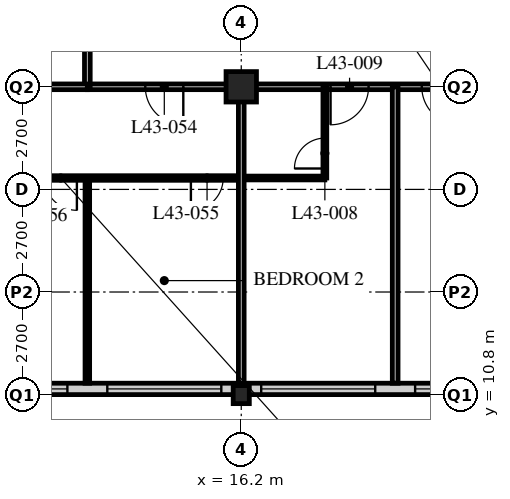
"""IFC4 building model, lengths in metres.
Left out: names, types, materials, properties, quantities, classifications, styles, units other than length and angle.
Written with IfcOpenShell. Run it as: python <this file> out.ifc"""

import sys

from ifc_helpers import new_model, si_unit, direction, frame, frame_2d, origin, origin_2d, place, context, subcontext, project, spatial, rectangle, hollow_rectangle, i_section, extrude, element, fill, save


model = new_model("IFC4")
c1 = context("Model", 3, precision=1e-05, world=origin(), true_north=direction((0.0, 1.0)))
c2 = subcontext(c1, "Body", "Model", "MODEL_VIEW")
j1 = project(units=[si_unit("LENGTHUNIT", "METRE"), si_unit("PLANEANGLEUNIT", "RADIAN")], contexts=[c1])
p1 = place(None, origin())
s1 = spatial("IfcSite", under=j1, at=p1, CompositionType="ELEMENT")
p2 = place(p1, origin())
s2 = spatial("IfcBuilding", under=s1, at=p2, CompositionType="ELEMENT")
p3 = place(p2, frame((0.0, 0.0, 170.4)))
s3 = spatial("IfcBuildingStorey", under=s2, at=p3, CompositionType="ELEMENT", Elevation=170.4)
p4 = place(p3, frame((16.2, 10.8, 0.0), z_axis=(0.0, 0.0, 1.0), x_axis=(1.0, 0.0, 0.0)))
e1 = element("IfcColumn", 1, at=p4, inside=s3, PredefinedType="COLUMN", context=c2, shape_type="SweptSolid", body=[
    extrude(i_section(OverallWidth=0.424, OverallDepth=0.475, WebThickness=0.048, FlangeThickness=0.077, FilletRadius=0.015, at=origin_2d()), origin(), (0.0, 0.0, 1.0), 3.6),
])
p5 = place(p3, frame((16.2, 18.9, 0.0), z_axis=(0.0, 0.0, 1.0), x_axis=(1.0, 0.0, 0.0)))
e2 = element("IfcColumn", 2, at=p5, inside=s3, PredefinedType="COLUMN", context=c2, shape_type="SweptSolid", body=[
    extrude(hollow_rectangle(XDim=0.8, YDim=0.8, WallThickness=0.08, at=origin_2d()), origin(), (0.0, 0.0, 1.0), 3.6),
])
p6 = place(p3, frame((8.4, 10.95, 0.0), z_axis=(0.0, 0.0, 1.0), x_axis=(1.0, 0.0, 0.0)))
e3 = element("IfcWall", 3, at=p6, inside=s3, PredefinedType="SOLIDWALL", context=c2, shape_type="SweptSolid", body=[
    extrude(rectangle(XDim=40.2, YDim=0.3, at=frame_2d((20.1, 0.0))), origin(), (0.0, 0.0, 1.0), 3.39),
])
p7 = place(p6, frame((0.225, 0.0, 0.6)))
e4 = element("IfcOpeningElement", 4, at=p7, cuts=e3, PredefinedType="OPENING", context=c2, shape_type="SweptSolid", body=[
    extrude(rectangle(XDim=3.0, YDim=2.4, at=frame_2d((1.5, 1.2))), frame((0.0, 0.16, 0.0), z_axis=(0.0, -1.0, 0.0), x_axis=(1.0, 0.0, 0.0)), (0.0, 0.0, 1.0), 0.32),
])
p8 = place(p6, frame((4.275, 0.0, 0.6)))
e5 = element("IfcOpeningElement", 5, at=p8, cuts=e3, PredefinedType="OPENING", context=c2, shape_type="SweptSolid", body=[
    extrude(rectangle(XDim=3.0, YDim=2.4, at=frame_2d((1.5, 1.2))), frame((0.0, 0.16, 0.0), z_axis=(0.0, -1.0, 0.0), x_axis=(1.0, 0.0, 0.0)), (0.0, 0.0, 1.0), 0.32),
])
p9 = place(p6, frame((8.325, 0.0, 0.6)))
e6 = element("IfcOpeningElement", 6, at=p9, cuts=e3, PredefinedType="OPENING", context=c2, shape_type="SweptSolid", body=[
    extrude(rectangle(XDim=3.0, YDim=2.4, at=frame_2d((1.5, 1.2))), frame((0.0, 0.16, 0.0), z_axis=(0.0, -1.0, 0.0), x_axis=(1.0, 0.0, 0.0)), (0.0, 0.0, 1.0), 0.32),
])
p10 = place(p6, frame((12.375, 0.0, 0.6)))
e7 = element("IfcOpeningElement", 7, at=p10, cuts=e3, PredefinedType="OPENING", context=c2, shape_type="SweptSolid", body=[
    extrude(rectangle(XDim=3.0, YDim=2.4, at=frame_2d((1.5, 1.2))), frame((0.0, 0.16, 0.0), z_axis=(0.0, -1.0, 0.0), x_axis=(1.0, 0.0, 0.0)), (0.0, 0.0, 1.0), 0.32),
])
p11 = place(p6, frame((16.425, 0.0, 0.6)))
e8 = element("IfcOpeningElement", 8, at=p11, cuts=e3, PredefinedType="OPENING", context=c2, shape_type="SweptSolid", body=[
    extrude(rectangle(XDim=3.0, YDim=2.4, at=frame_2d((1.5, 1.2))), frame((0.0, 0.16, 0.0), z_axis=(0.0, -1.0, 0.0), x_axis=(1.0, 0.0, 0.0)), (0.0, 0.0, 1.0), 0.32),
])
p12 = place(p6, frame((20.475, 0.0, 0.6)))
e9 = element("IfcOpeningElement", 9, at=p12, cuts=e3, PredefinedType="OPENING", context=c2, shape_type="SweptSolid", body=[
    extrude(rectangle(XDim=3.0, YDim=2.4, at=frame_2d((1.5, 1.2))), frame((0.0, 0.16, 0.0), z_axis=(0.0, -1.0, 0.0), x_axis=(1.0, 0.0, 0.0)), (0.0, 0.0, 1.0), 0.32),
])
p13 = place(p6, frame((24.525, 0.0, 0.6)))
e10 = element("IfcOpeningElement", 10, at=p13, cuts=e3, PredefinedType="OPENING", context=c2, shape_type="SweptSolid", body=[
    extrude(rectangle(XDim=3.0, YDim=2.4, at=frame_2d((1.5, 1.2))), frame((0.0, 0.16, 0.0), z_axis=(0.0, -1.0, 0.0), x_axis=(1.0, 0.0, 0.0)), (0.0, 0.0, 1.0), 0.32),
])
p14 = place(p6, frame((28.575, 0.0, 0.6)))
e11 = element("IfcOpeningElement", 11, at=p14, cuts=e3, PredefinedType="OPENING", context=c2, shape_type="SweptSolid", body=[
    extrude(rectangle(XDim=3.0, YDim=2.4, at=frame_2d((1.5, 1.2))), frame((0.0, 0.16, 0.0), z_axis=(0.0, -1.0, 0.0), x_axis=(1.0, 0.0, 0.0)), (0.0, 0.0, 1.0), 0.32),
])
p15 = place(p6, frame((32.625, 0.0, 0.6)))
e12 = element("IfcOpeningElement", 12, at=p15, cuts=e3, PredefinedType="OPENING", context=c2, shape_type="SweptSolid", body=[
    extrude(rectangle(XDim=3.0, YDim=2.4, at=frame_2d((1.5, 1.2))), frame((0.0, 0.16, 0.0), z_axis=(0.0, -1.0, 0.0), x_axis=(1.0, 0.0, 0.0)), (0.0, 0.0, 1.0), 0.32),
])
p16 = place(p6, frame((36.675, 0.0, 0.6)))
e13 = element("IfcOpeningElement", 13, at=p16, cuts=e3, PredefinedType="OPENING", context=c2, shape_type="SweptSolid", body=[
    extrude(rectangle(XDim=3.0, YDim=2.4, at=frame_2d((1.5, 1.2))), frame((0.0, 0.16, 0.0), z_axis=(0.0, -1.0, 0.0), x_axis=(1.0, 0.0, 0.0)), (0.0, 0.0, 1.0), 0.32),
])
p17 = place(p3, frame((12.15, 18.9, 0.0), z_axis=(0.0, 0.0, 1.0), x_axis=(1.0, 0.0, 0.0)))
e14 = element("IfcWall", 14, at=p17, inside=s3, PredefinedType="PARTITIONING", context=c2, shape_type="SweptSolid", body=[
    extrude(rectangle(XDim=32.4, YDim=0.15, at=frame_2d((16.2, 0.0))), origin(), (0.0, 0.0, 1.0), 2.778),
])
p18 = place(p17, frame((6.4, 0.0, 0.0)))
e15 = element("IfcOpeningElement", 15, at=p18, cuts=e14, PredefinedType="OPENING", context=c2, shape_type="SweptSolid", body=[
    extrude(rectangle(XDim=1.0, YDim=2.1, at=frame_2d((0.5, 1.05))), frame((0.0, 0.085, 0.0), z_axis=(0.0, -1.0, 0.0), x_axis=(1.0, 0.0, 0.0)), (0.0, 0.0, 1.0), 0.17),
])
p19 = place(p17, frame((8.8, 0.0, 0.0)))
e16 = element("IfcOpeningElement", 16, at=p19, cuts=e14, PredefinedType="OPENING", context=c2, shape_type="SweptSolid", body=[
    extrude(rectangle(XDim=1.0, YDim=2.1, at=frame_2d((0.5, 1.05))), frame((0.0, 0.085, 0.0), z_axis=(0.0, -1.0, 0.0), x_axis=(1.0, 0.0, 0.0)), (0.0, 0.0, 1.0), 0.17),
])
p20 = place(p17, frame((13.05, 0.0, 0.0)))
e17 = element("IfcOpeningElement", 17, at=p20, cuts=e14, PredefinedType="OPENING", context=c2, shape_type="SweptSolid", body=[
    extrude(rectangle(XDim=1.0, YDim=2.1, at=frame_2d((0.5, 1.05))), frame((0.0, 0.085, 0.0), z_axis=(0.0, -1.0, 0.0), x_axis=(1.0, 0.0, 0.0)), (0.0, 0.0, 1.0), 0.17),
])
p21 = place(p17, frame((22.6, 0.0, 0.0)))
e18 = element("IfcOpeningElement", 18, at=p21, cuts=e14, PredefinedType="OPENING", context=c2, shape_type="SweptSolid", body=[
    extrude(rectangle(XDim=1.0, YDim=2.1, at=frame_2d((0.5, 1.05))), frame((0.0, 0.085, 0.0), z_axis=(0.0, -1.0, 0.0), x_axis=(1.0, 0.0, 0.0)), (0.0, 0.0, 1.0), 0.17),
])
p22 = place(p17, frame((25.0, 0.0, 0.0)))
e19 = element("IfcOpeningElement", 19, at=p22, cuts=e14, PredefinedType="OPENING", context=c2, shape_type="SweptSolid", body=[
    extrude(rectangle(XDim=1.0, YDim=2.1, at=frame_2d((0.5, 1.05))), frame((0.0, 0.085, 0.0), z_axis=(0.0, -1.0, 0.0), x_axis=(1.0, 0.0, 0.0)), (0.0, 0.0, 1.0), 0.17),
])
p23 = place(p17, frame((1.525, 0.0, 0.0)))
e20 = element("IfcOpeningElement", 20, at=p23, cuts=e14, PredefinedType="OPENING", context=c2, shape_type="SweptSolid", body=[
    extrude(rectangle(XDim=1.0, YDim=2.1, at=frame_2d((0.5, 1.05))), frame((0.0, 0.085, 0.0), z_axis=(0.0, -1.0, 0.0), x_axis=(1.0, 0.0, 0.0)), (0.0, 0.0, 1.0), 0.17),
])
p24 = place(p17, frame((29.875, 0.0, 0.0)))
e21 = element("IfcOpeningElement", 21, at=p24, cuts=e14, PredefinedType="OPENING", context=c2, shape_type="SweptSolid", body=[
    extrude(rectangle(XDim=1.0, YDim=2.1, at=frame_2d((0.5, 1.05))), frame((0.0, 0.085, 0.0), z_axis=(0.0, -1.0, 0.0), x_axis=(1.0, 0.0, 0.0)), (0.0, 0.0, 1.0), 0.17),
])
p25 = place(p3, frame((12.15, 18.9, 0.0), z_axis=(0.0, 0.0, 1.0), x_axis=(0.0, 1.0, 0.0)))
e22 = element("IfcWall", 22, at=p25, inside=s3, PredefinedType="PARTITIONING", context=c2, shape_type="SweptSolid", body=[
    extrude(rectangle(XDim=24.3, YDim=0.15, at=frame_2d((12.15, 0.0))), origin(), (0.0, 0.0, 1.0), 3.39),
])
p26 = place(p25, frame((2.35, 0.0, 0.0)))
e23 = element("IfcOpeningElement", 23, at=p26, cuts=e22, PredefinedType="OPENING", context=c2, shape_type="SweptSolid", body=[
    extrude(rectangle(XDim=1.0, YDim=2.1, at=frame_2d((0.5, 1.05))), frame((0.0, 0.085, 0.0), z_axis=(0.0, -1.0, 0.0), x_axis=(1.0, 0.0, 0.0)), (0.0, 0.0, 1.0), 0.17),
])
p27 = place(p25, frame((6.4, 0.0, 0.0)))
e24 = element("IfcOpeningElement", 24, at=p27, cuts=e22, PredefinedType="OPENING", context=c2, shape_type="SweptSolid", body=[
    extrude(rectangle(XDim=1.0, YDim=2.1, at=frame_2d((0.5, 1.05))), frame((0.0, 0.085, 0.0), z_axis=(0.0, -1.0, 0.0), x_axis=(1.0, 0.0, 0.0)), (0.0, 0.0, 1.0), 0.17),
])
p28 = place(p25, frame((8.5, 0.0, 0.0)))
e25 = element("IfcOpeningElement", 25, at=p28, cuts=e22, PredefinedType="OPENING", context=c2, shape_type="SweptSolid", body=[
    extrude(rectangle(XDim=1.0, YDim=2.1, at=frame_2d((0.5, 1.05))), frame((0.0, 0.085, 0.0), z_axis=(0.0, -1.0, 0.0), x_axis=(1.0, 0.0, 0.0)), (0.0, 0.0, 1.0), 0.17),
])
p29 = place(p25, frame((16.6, 0.0, 0.0)))
e26 = element("IfcOpeningElement", 26, at=p29, cuts=e22, PredefinedType="OPENING", context=c2, shape_type="SweptSolid", body=[
    extrude(rectangle(XDim=1.0, YDim=2.1, at=frame_2d((0.5, 1.05))), frame((0.0, 0.085, 0.0), z_axis=(0.0, -1.0, 0.0), x_axis=(1.0, 0.0, 0.0)), (0.0, 0.0, 1.0), 0.17),
])
p30 = place(p3, frame((16.2, 16.5, 0.0), z_axis=(0.0, 0.0, 1.0), x_axis=(1.0, 0.0, 0.0)))
e27 = element("IfcWall", 27, at=p30, inside=s3, PredefinedType="PARTITIONING", context=c2, shape_type="SweptSolid", body=[
    extrude(rectangle(XDim=2.2, YDim=0.1, at=frame_2d((1.1, 0.0))), origin(), (0.0, 0.0, 1.0), 3.39),
])
p31 = place(p3, frame((18.4, 18.9, 0.0), z_axis=(0.0, 0.0, 1.0), x_axis=(0.0, -1.0, 0.0)))
e28 = element("IfcWall", 28, at=p31, inside=s3, PredefinedType="PARTITIONING", context=c2, shape_type="SweptSolid", body=[
    extrude(rectangle(XDim=2.4, YDim=0.1, at=frame_2d((1.2, 0.0))), origin(), (0.0, 0.0, 1.0), 3.39),
])
p32 = place(p31, frame((1.35, 0.0, 0.0)))
e29 = element("IfcOpeningElement", 29, at=p32, cuts=e28, PredefinedType="OPENING", context=c2, shape_type="SweptSolid", body=[
    extrude(rectangle(XDim=0.8, YDim=2.1, at=frame_2d((0.4, 1.05))), frame((0.0, 0.06, 0.0), z_axis=(0.0, -1.0, 0.0), x_axis=(1.0, 0.0, 0.0)), (0.0, 0.0, 1.0), 0.12),
])
p33 = place(p3, frame((20.25, 18.9, 0.0), z_axis=(0.0, 0.0, 1.0), x_axis=(0.0, -1.0, 0.0)))
e30 = element("IfcWall", 30, at=p33, inside=s3, PredefinedType="PARTITIONING", context=c2, shape_type="SweptSolid", body=[
    extrude(rectangle(XDim=7.8, YDim=0.15, at=frame_2d((3.9, 0.0))), origin(), (0.0, 0.0, 1.0), 3.39),
])
p34 = place(p3, frame((8.15, 16.5, 0.0), z_axis=(0.0, 0.0, 1.0), x_axis=(1.0, 0.0, 0.0)))
e31 = element("IfcWall", 31, at=p34, inside=s3, PredefinedType="PARTITIONING", context=c2, shape_type="SweptSolid", body=[
    extrude(rectangle(XDim=8.05, YDim=0.12, at=frame_2d((4.025, 0.0))), origin(), (0.0, 0.0, 1.0), 3.39),
])
p35 = place(p34, frame((6.725, 0.0, 0.0)))
e32 = element("IfcOpeningElement", 32, at=p35, cuts=e31, PredefinedType="OPENING", context=c2, shape_type="SweptSolid", body=[
    extrude(rectangle(XDim=0.85, YDim=2.1, at=frame_2d((0.425, 1.05))), frame((0.0, 0.07, 0.0), z_axis=(0.0, -1.0, 0.0), x_axis=(1.0, 0.0, 0.0)), (0.0, 0.0, 1.0), 0.14),
])
p36 = place(p34, frame((2.875, 0.0, 0.0)))
e33 = element("IfcOpeningElement", 33, at=p36, cuts=e31, PredefinedType="OPENING", context=c2, shape_type="SweptSolid", body=[
    extrude(rectangle(XDim=0.85, YDim=2.1, at=frame_2d((0.425, 1.05))), frame((0.0, 0.07, 0.0), z_axis=(0.0, -1.0, 0.0), x_axis=(1.0, 0.0, 0.0)), (0.0, 0.0, 1.0), 0.14),
])
p37 = place(p3, frame((12.15, 16.5, 0.0), z_axis=(0.0, 0.0, 1.0), x_axis=(0.0, -1.0, 0.0)))
e34 = element("IfcWall", 34, at=p37, inside=s3, PredefinedType="PARTITIONING", context=c2, shape_type="SweptSolid", body=[
    extrude(rectangle(XDim=5.4, YDim=0.12, at=frame_2d((2.7, 0.0))), origin(), (0.0, 0.0, 1.0), 3.39),
])
for number, where, z_axis, x_axis in (
    (35, (4.35, 18.9, 0.0), (0.0, 0.0, 1.0), (1.0, 0.0, 0.0)),
    (36, (16.2, 18.9, 0.0), (0.0, 0.0, 1.0), (0.0, -1.0, 0.0)),
):
    element("IfcWall", number, at=place(p3, frame(where, z_axis=z_axis, x_axis=x_axis)), inside=s3, PredefinedType="PARTITIONING", context=c2, shape_type="SweptSolid", body=[
        extrude(rectangle(XDim=7.8, YDim=0.15, at=frame_2d((3.9, 0.0))), origin(), (0.0, 0.0, 1.0), 2.778),
    ])
p38 = place(p7, origin())
e37 = element("IfcWindow", 37, at=p38, inside=s3, PartitioningType="SINGLE_PANEL", PredefinedType="WINDOW", context=c2, shape_type="SweptSolid", body=[
    extrude(rectangle(XDim=3.0, YDim=2.4, at=frame_2d((1.5, 1.2))), frame((0.0, 0.03, 0.0), z_axis=(0.0, -1.0, 0.0), x_axis=(1.0, 0.0, 0.0)), (0.0, 0.0, 1.0), 0.06),
])
fill(e4, e37)
p39 = place(p8, origin())
e38 = element("IfcWindow", 38, at=p39, inside=s3, PartitioningType="SINGLE_PANEL", PredefinedType="WINDOW", context=c2, shape_type="SweptSolid", body=[
    extrude(rectangle(XDim=3.0, YDim=2.4, at=frame_2d((1.5, 1.2))), frame((0.0, 0.03, 0.0), z_axis=(0.0, -1.0, 0.0), x_axis=(1.0, 0.0, 0.0)), (0.0, 0.0, 1.0), 0.06),
])
fill(e5, e38)
p40 = place(p9, origin())
e39 = element("IfcWindow", 39, at=p40, inside=s3, PartitioningType="SINGLE_PANEL", PredefinedType="WINDOW", context=c2, shape_type="SweptSolid", body=[
    extrude(rectangle(XDim=3.0, YDim=2.4, at=frame_2d((1.5, 1.2))), frame((0.0, 0.03, 0.0), z_axis=(0.0, -1.0, 0.0), x_axis=(1.0, 0.0, 0.0)), (0.0, 0.0, 1.0), 0.06),
])
fill(e6, e39)
p41 = place(p10, origin())
e40 = element("IfcWindow", 40, at=p41, inside=s3, PartitioningType="SINGLE_PANEL", PredefinedType="WINDOW", context=c2, shape_type="SweptSolid", body=[
    extrude(rectangle(XDim=3.0, YDim=2.4, at=frame_2d((1.5, 1.2))), frame((0.0, 0.03, 0.0), z_axis=(0.0, -1.0, 0.0), x_axis=(1.0, 0.0, 0.0)), (0.0, 0.0, 1.0), 0.06),
])
fill(e7, e40)
p42 = place(p32, origin())
e41 = element("IfcDoor", 41, at=p42, inside=s3, OperationType="SINGLE_SWING_LEFT", PredefinedType="DOOR", context=c2, shape_type="SweptSolid", body=[
    extrude(rectangle(XDim=0.8, YDim=2.1, at=frame_2d((0.4, 1.05))), frame((0.0, 0.025, 0.0), z_axis=(0.0, -1.0, 0.0), x_axis=(1.0, 0.0, 0.0)), (0.0, 0.0, 1.0), 0.05),
])
fill(e29, e41)
p43 = place(p18, origin())
e42 = element("IfcDoor", 42, at=p43, inside=s3, OperationType="SINGLE_SWING_RIGHT", PredefinedType="DOOR", context=c2, shape_type="SweptSolid", body=[
    extrude(rectangle(XDim=1.0, YDim=2.1, at=frame_2d((0.5, 1.05))), frame((0.0, 0.025, 0.0), z_axis=(0.0, -1.0, 0.0), x_axis=(1.0, 0.0, 0.0)), (0.0, 0.0, 1.0), 0.05),
])
fill(e15, e42)
p44 = place(p19, origin())
e43 = element("IfcDoor", 43, at=p44, inside=s3, OperationType="SINGLE_SWING_LEFT", PredefinedType="DOOR", context=c2, shape_type="SweptSolid", body=[
    extrude(rectangle(XDim=1.0, YDim=2.1, at=frame_2d((0.5, 1.05))), frame((0.0, 0.025, 0.0), z_axis=(0.0, -1.0, 0.0), x_axis=(1.0, 0.0, 0.0)), (0.0, 0.0, 1.0), 0.05),
])
fill(e16, e43)
p45 = place(p23, origin())
e44 = element("IfcDoor", 44, at=p45, inside=s3, OperationType="SINGLE_SWING_LEFT", PredefinedType="DOOR", context=c2, shape_type="SweptSolid", body=[
    extrude(rectangle(XDim=1.0, YDim=2.1, at=frame_2d((0.5, 1.05))), frame((0.0, 0.025, 0.0), z_axis=(0.0, -1.0, 0.0), x_axis=(1.0, 0.0, 0.0)), (0.0, 0.0, 1.0), 0.05),
])
fill(e20, e44)
p46 = place(p35, origin())
e45 = element("IfcDoor", 45, at=p46, inside=s3, OperationType="SINGLE_SWING_RIGHT", PredefinedType="DOOR", context=c2, shape_type="SweptSolid", body=[
    extrude(rectangle(XDim=0.85, YDim=2.1, at=frame_2d((0.425, 1.05))), frame((0.0, 0.025, 0.0), z_axis=(0.0, -1.0, 0.0), x_axis=(1.0, 0.0, 0.0)), (0.0, 0.0, 1.0), 0.05),
])
fill(e32, e45)
p47 = place(p36, origin())
e46 = element("IfcDoor", 46, at=p47, inside=s3, OperationType="SINGLE_SWING_LEFT", PredefinedType="DOOR", context=c2, shape_type="SweptSolid", body=[
    extrude(rectangle(XDim=0.85, YDim=2.1, at=frame_2d((0.425, 1.05))), frame((0.0, 0.025, 0.0), z_axis=(0.0, -1.0, 0.0), x_axis=(1.0, 0.0, 0.0)), (0.0, 0.0, 1.0), 0.05),
])
fill(e33, e46)
save(model, sys.argv[1])
